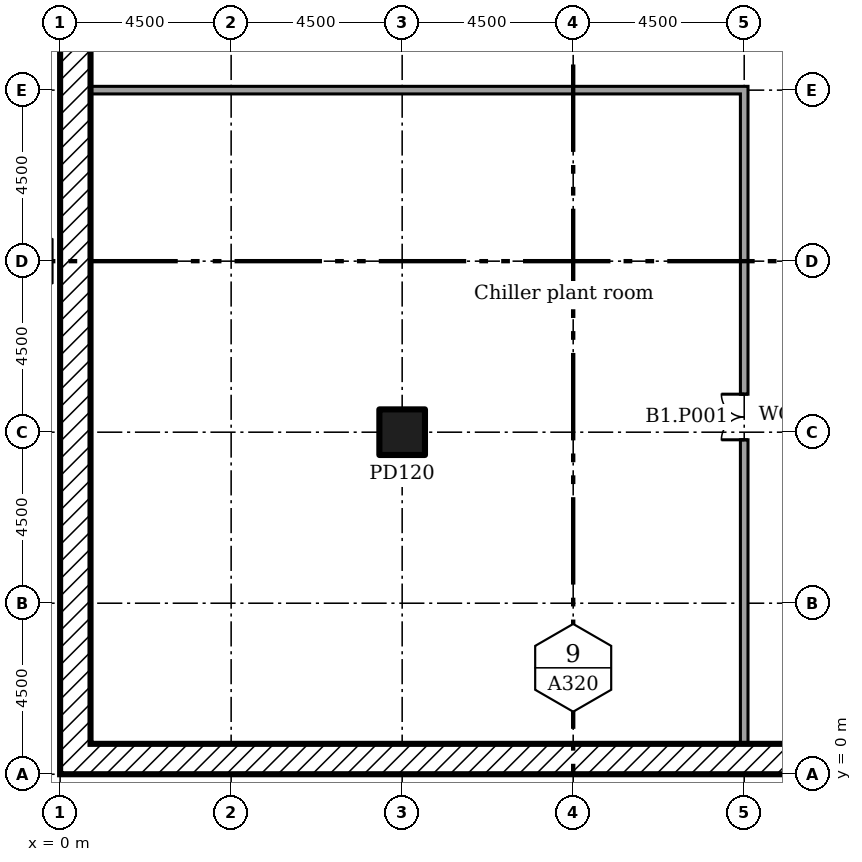
"""IFC4 building model, lengths in metres.
Left out: names, types, materials, properties, quantities, classifications, styles, units other than length and angle.
Written with IfcOpenShell. Run it as: python <this file> out.ifc"""

import sys

from ifc_helpers import new_model, si_unit, direction, frame, frame_2d, origin, origin_2d, place, context, subcontext, project, spatial, rectangle, extrude, element, fill, save


model = new_model("IFC4")
c1 = context("Model", 3, precision=1e-05, world=origin(), true_north=direction((0.0, 1.0)))
c2 = subcontext(c1, "Body", "Model", "MODEL_VIEW")
j1 = project(units=[si_unit("LENGTHUNIT", "METRE"), si_unit("PLANEANGLEUNIT", "RADIAN")], contexts=[c1])
p1 = place(None, origin())
s1 = spatial("IfcSite", under=j1, at=p1, CompositionType="ELEMENT")
p2 = place(p1, origin())
s2 = spatial("IfcBuilding", under=s1, at=p2, CompositionType="ELEMENT")
p3 = place(p2, frame((0.0, 0.0, -4.0)))
s3 = spatial("IfcBuildingStorey", under=s2, at=p3, CompositionType="ELEMENT", Elevation=-4.0)
p4 = place(p3, frame((9.0, 9.0, 0.0)))
e1 = element("IfcColumn", 1, at=p4, inside=s3, PredefinedType="COLUMN", context=c2, shape_type="SweptSolid", body=[
    extrude(rectangle(XDim=1.2, YDim=1.2, at=origin_2d()), origin(), (0.0, 0.0, 1.0), 4.0),
])
p5 = place(p3, frame((0.0, 0.4, 0.0)))
e2 = element("IfcWall", 2, at=p5, inside=s3, PredefinedType="SOLIDWALL", context=c2, shape_type="SweptSolid", body=[
    extrude(rectangle(XDim=153.0, YDim=0.8, at=frame_2d((76.5, 0.0))), origin(), (0.0, 0.0, 1.0), 4.0),
])
p6 = place(p3, frame((0.4, 0.8, 0.0), z_axis=(0.0, 0.0, 1.0), x_axis=(0.0, 1.0, 0.0)))
e3 = element("IfcWall", 3, at=p6, inside=s3, PredefinedType="SOLIDWALL", context=c2, shape_type="SweptSolid", body=[
    extrude(rectangle(XDim=97.4, YDim=0.8, at=frame_2d((48.7, 0.0))), origin(), (0.0, 0.0, 1.0), 4.0),
])
p7 = place(p3, frame((18.0, 0.8, 0.0), z_axis=(0.0, 0.0, 1.0), x_axis=(0.0, 1.0, 0.0)))
e4 = element("IfcWall", 4, at=p7, inside=s3, PredefinedType="SOLIDWALL", context=c2, shape_type="SweptSolid", body=[
    extrude(rectangle(XDim=17.3, YDim=0.2, at=frame_2d((8.65, 0.0))), origin(), (0.0, 0.0, 1.0), 3.55),
])
p8 = place(p7, frame((8.0, 0.0, 0.0)))
e5 = element("IfcOpeningElement", 5, at=p8, cuts=e4, PredefinedType="OPENING", context=c2, shape_type="SweptSolid", body=[
    extrude(rectangle(XDim=1.2, YDim=2.1, at=frame_2d((0.6, 1.05))), frame((0.0, 0.11, 0.0), z_axis=(0.0, -1.0, 0.0), x_axis=(1.0, 0.0, 0.0)), (0.0, 0.0, 1.0), 0.22),
])
p9 = place(p3, frame((0.8, 18.0, 0.0)))
e6 = element("IfcWall", 6, at=p9, inside=s3, PredefinedType="SOLIDWALL", context=c2, shape_type="SweptSolid", body=[
    extrude(rectangle(XDim=17.1, YDim=0.2, at=frame_2d((8.55, 0.0))), origin(), (0.0, 0.0, 1.0), 3.55),
])
p10 = place(p8, origin())
e7 = element("IfcDoor", 7, at=p10, inside=s3, OperationType="DOUBLE_DOOR_SINGLE_SWING", PredefinedType="DOOR", context=c2, shape_type="SweptSolid", body=[
    extrude(rectangle(XDim=1.2, YDim=2.1, at=frame_2d((0.6, 1.05))), frame((0.0, 0.025, 0.0), z_axis=(0.0, -1.0, 0.0), x_axis=(1.0, 0.0, 0.0)), (0.0, 0.0, 1.0), 0.05),
])
fill(e5, e7)
save(model, sys.argv[1])
